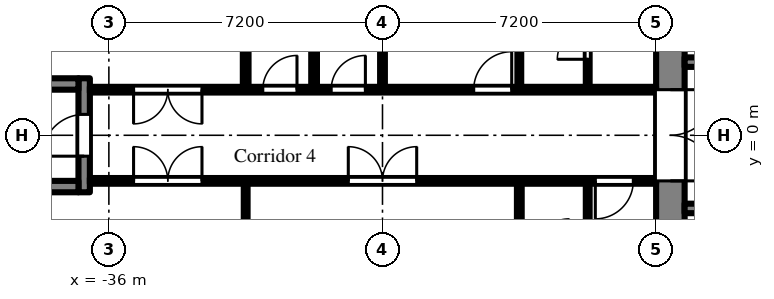
"""IFC4 building model, lengths in metres.
Left out: names, types, materials, properties, quantities, classifications, styles, units other than length and angle.
Written with IfcOpenShell. Run it as: python <this file> out.ifc"""

import sys

from ifc_helpers import new_model, si_unit, direction, frame, frame_2d, origin, place, context, subcontext, project, spatial, rectangle, extrude, element, fill, save


model = new_model("IFC4")
c1 = context("Model", 3, precision=1e-05, world=origin(), true_north=direction((0.0, 1.0)))
c2 = subcontext(c1, "Body", "Model", "MODEL_VIEW")
j1 = project(units=[si_unit("LENGTHUNIT", "METRE"), si_unit("PLANEANGLEUNIT", "RADIAN")], contexts=[c1])
p1 = place(None, origin())
s1 = spatial("IfcSite", under=j1, at=p1, CompositionType="ELEMENT")
p2 = place(p1, origin())
s2 = spatial("IfcBuilding", under=s1, at=p2, CompositionType="ELEMENT")
p3 = place(p2, frame((0.0, 0.0, 84.9)))
s3 = spatial("IfcBuildingStorey", under=s2, at=p3, CompositionType="ELEMENT", Elevation=84.9)
p4 = place(p3, frame((-21.225, -7.2, 0.0), z_axis=(0.0, 0.0, 1.0), x_axis=(0.0, 1.0, 0.0)))
e1 = element("IfcWall", 1, at=p4, inside=s3, PredefinedType="SHEAR", context=c2, shape_type="SweptSolid", body=[
    extrude(rectangle(XDim=14.4, YDim=0.75, at=frame_2d((7.2, 0.0))), origin(), (0.0, 0.0, 1.0), 2.575),
])
p5 = place(p4, frame((6.0, 0.0, 0.0)))
e2 = element("IfcOpeningElement", 2, at=p5, cuts=e1, PredefinedType="OPENING", context=c2, shape_type="SweptSolid", body=[
    extrude(rectangle(XDim=2.4, YDim=2.2, at=frame_2d((1.2, 1.1))), frame((0.0, 0.385, 0.0), z_axis=(0.0, -1.0, 0.0), x_axis=(1.0, 0.0, 0.0)), (0.0, 0.0, 1.0), 0.77),
])
p6 = place(p3, frame((-7.9, 1.925, 0.0), z_axis=(0.0, 0.0, 1.0), x_axis=(-1.0, 0.0, 0.0)))
e3 = element("IfcWall", 3, at=p6, inside=s3, PredefinedType="SHEAR", context=c2, shape_type="SweptSolid", body=[
    extrude(rectangle(XDim=12.95, YDim=0.25, at=frame_2d((6.475, 0.0))), origin(), (0.0, 0.0, 1.0), 2.575),
])
p7 = place(p6, frame((0.525, 0.0, 0.0)))
e4 = element("IfcOpeningElement", 4, at=p7, cuts=e3, PredefinedType="OPENING", context=c2, shape_type="SweptSolid", body=[
    extrude(rectangle(XDim=0.9, YDim=2.1, at=frame_2d((0.45, 1.05))), frame((0.0, 0.135, 0.0), z_axis=(0.0, -1.0, 0.0), x_axis=(1.0, 0.0, 0.0)), (0.0, 0.0, 1.0), 0.27),
])
p8 = place(p6, frame((2.625, 0.0, 0.0)))
e5 = element("IfcOpeningElement", 5, at=p8, cuts=e3, PredefinedType="OPENING", context=c2, shape_type="SweptSolid", body=[
    extrude(rectangle(XDim=1.1, YDim=2.1, at=frame_2d((0.55, 1.05))), frame((0.0, 0.135, 0.0), z_axis=(0.0, -1.0, 0.0), x_axis=(1.0, 0.0, 0.0)), (0.0, 0.0, 1.0), 0.27),
])
p9 = place(p6, frame((6.025, 0.0, 0.0)))
e6 = element("IfcOpeningElement", 6, at=p9, cuts=e3, PredefinedType="OPENING", context=c2, shape_type="SweptSolid", body=[
    extrude(rectangle(XDim=0.9, YDim=2.1, at=frame_2d((0.45, 1.05))), frame((0.0, 0.135, 0.0), z_axis=(0.0, -1.0, 0.0), x_axis=(1.0, 0.0, 0.0)), (0.0, 0.0, 1.0), 0.27),
])
p10 = place(p6, frame((9.325, 0.0, 0.0)))
e7 = element("IfcOpeningElement", 7, at=p10, cuts=e3, PredefinedType="OPENING", context=c2, shape_type="SweptSolid", body=[
    extrude(rectangle(XDim=0.9, YDim=2.1, at=frame_2d((0.45, 1.05))), frame((0.0, 0.135, 0.0), z_axis=(0.0, -1.0, 0.0), x_axis=(1.0, 0.0, 0.0)), (0.0, 0.0, 1.0), 0.27),
])
p11 = place(p3, frame((-7.9, -1.925, 0.0), z_axis=(0.0, 0.0, 1.0), x_axis=(-1.0, 0.0, 0.0)))
e8 = element("IfcWall", 8, at=p11, inside=s3, PredefinedType="SHEAR", context=c2, shape_type="SweptSolid", body=[
    extrude(rectangle(XDim=12.95, YDim=0.25, at=frame_2d((6.475, 0.0))), origin(), (0.0, 0.0, 1.0), 2.575),
])
p12 = place(p11, frame((4.825, 0.0, 0.0)))
e9 = element("IfcOpeningElement", 9, at=p12, cuts=e8, PredefinedType="OPENING", context=c2, shape_type="SweptSolid", body=[
    extrude(rectangle(XDim=1.1, YDim=2.1, at=frame_2d((0.55, 1.05))), frame((0.0, 0.135, 0.0), z_axis=(0.0, -1.0, 0.0), x_axis=(1.0, 0.0, 0.0)), (0.0, 0.0, 1.0), 0.27),
])
p13 = place(p11, frame((7.025, 0.0, 0.0)))
e10 = element("IfcOpeningElement", 10, at=p13, cuts=e8, PredefinedType="OPENING", context=c2, shape_type="SweptSolid", body=[
    extrude(rectangle(XDim=1.1, YDim=2.1, at=frame_2d((0.55, 1.05))), frame((0.0, 0.135, 0.0), z_axis=(0.0, -1.0, 0.0), x_axis=(1.0, 0.0, 0.0)), (0.0, 0.0, 1.0), 0.27),
])
p14 = place(p11, frame((9.225, 0.0, 0.0)))
e11 = element("IfcOpeningElement", 11, at=p14, cuts=e8, PredefinedType="OPENING", context=c2, shape_type="SweptSolid", body=[
    extrude(rectangle(XDim=1.1, YDim=2.1, at=frame_2d((0.55, 1.05))), frame((0.0, 0.135, 0.0), z_axis=(0.0, -1.0, 0.0), x_axis=(1.0, 0.0, 0.0)), (0.0, 0.0, 1.0), 0.27),
])
p15 = place(p11, frame((0.525, 0.0, 0.0)))
e12 = element("IfcOpeningElement", 12, at=p15, cuts=e8, PredefinedType="OPENING", context=c2, shape_type="SweptSolid", body=[
    extrude(rectangle(XDim=0.9, YDim=2.1, at=frame_2d((0.45, 1.05))), frame((0.0, 0.135, 0.0), z_axis=(0.0, -1.0, 0.0), x_axis=(1.0, 0.0, 0.0)), (0.0, 0.0, 1.0), 0.27),
])
p16 = place(p11, frame((2.625, 0.0, 0.0)))
e13 = element("IfcOpeningElement", 13, at=p16, cuts=e8, PredefinedType="OPENING", context=c2, shape_type="SweptSolid", body=[
    extrude(rectangle(XDim=1.1, YDim=2.1, at=frame_2d((0.55, 1.05))), frame((0.0, 0.135, 0.0), z_axis=(0.0, -1.0, 0.0), x_axis=(1.0, 0.0, 0.0)), (0.0, 0.0, 1.0), 0.27),
])
p17 = place(p3, frame((-36.65, -1.5, 0.0), z_axis=(0.0, 0.0, 1.0), x_axis=(0.0, 1.0, 0.0)))
e14 = element("IfcWall", 14, at=p17, inside=s3, PredefinedType="SHEAR", context=c2, shape_type="SweptSolid", body=[
    extrude(rectangle(XDim=3.0, YDim=0.3, at=frame_2d((1.5, 0.0))), origin(), (0.0, 0.0, 1.0), 2.575),
])
p18 = place(p17, frame((0.95, 0.0, 0.0)))
e15 = element("IfcOpeningElement", 15, at=p18, cuts=e14, PredefinedType="OPENING", context=c2, shape_type="SweptSolid", body=[
    extrude(rectangle(XDim=1.1, YDim=2.1, at=frame_2d((0.55, 1.05))), frame((0.0, 0.16, 0.0), z_axis=(0.0, -1.0, 0.0), x_axis=(1.0, 0.0, 0.0)), (0.0, 0.0, 1.0), 0.32),
])
for number, where, z_axis, x_axis in (
    (16, (-36.8, -1.35, 0.0), (0.0, 0.0, 1.0), (-1.0, 0.0, 0.0)),
    (17, (-36.8, 1.35, 0.0), (0.0, 0.0, 1.0), (-1.0, 0.0, 0.0)),
):
    element("IfcWall", number, at=place(p3, frame(where, z_axis=z_axis, x_axis=x_axis)), inside=s3, PredefinedType="SHEAR", context=c2, shape_type="SweptSolid", body=[
        extrude(rectangle(XDim=5.8, YDim=0.3, at=frame_2d((2.9, 0.0))), origin(), (0.0, 0.0, 1.0), 2.575),
    ])
p19 = place(p3, frame((-36.5, -1.2, 0.0), z_axis=(0.0, 0.0, 1.0), x_axis=(1.0, 0.0, 0.0)))
e18 = element("IfcWall", 18, at=p19, inside=s3, PredefinedType="PARTITIONING", context=c2, shape_type="SweptSolid", body=[
    extrude(rectangle(XDim=14.9, YDim=0.15, at=frame_2d((7.45, 0.0))), origin(), (0.0, 0.0, 1.0), 2.575),
])
p20 = place(p19, frame((13.3, 0.0, 0.0)))
e19 = element("IfcOpeningElement", 19, at=p20, cuts=e18, PredefinedType="OPENING", context=c2, shape_type="SweptSolid", body=[
    extrude(rectangle(XDim=1.0, YDim=2.1, at=frame_2d((0.5, 1.05))), frame((0.0, 0.085, 0.0), z_axis=(0.0, -1.0, 0.0), x_axis=(1.0, 0.0, 0.0)), (0.0, 0.0, 1.0), 0.17),
])
p21 = place(p19, frame((6.8, 0.0, 0.0)))
e20 = element("IfcOpeningElement", 20, at=p21, cuts=e18, PredefinedType="OPENING", context=c2, shape_type="SweptSolid", body=[
    extrude(rectangle(XDim=1.8, YDim=2.1, at=frame_2d((0.9, 1.05))), frame((0.0, 0.085, 0.0), z_axis=(0.0, -1.0, 0.0), x_axis=(1.0, 0.0, 0.0)), (0.0, 0.0, 1.0), 0.17),
])
p22 = place(p19, frame((1.15, 0.0, 0.0)))
e21 = element("IfcOpeningElement", 21, at=p22, cuts=e18, PredefinedType="OPENING", context=c2, shape_type="SweptSolid", body=[
    extrude(rectangle(XDim=1.8, YDim=2.1, at=frame_2d((0.9, 1.05))), frame((0.0, 0.085, 0.0), z_axis=(0.0, -1.0, 0.0), x_axis=(1.0, 0.0, 0.0)), (0.0, 0.0, 1.0), 0.17),
])
p23 = place(p3, frame((-36.5, 1.2, 0.0), z_axis=(0.0, 0.0, 1.0), x_axis=(1.0, 0.0, 0.0)))
e22 = element("IfcWall", 22, at=p23, inside=s3, PredefinedType="PARTITIONING", context=c2, shape_type="SweptSolid", body=[
    extrude(rectangle(XDim=14.9, YDim=0.15, at=frame_2d((7.45, 0.0))), origin(), (0.0, 0.0, 1.0), 2.575),
])
p24 = place(p23, frame((10.1, 0.0, 0.0)))
e23 = element("IfcOpeningElement", 23, at=p24, cuts=e22, PredefinedType="OPENING", context=c2, shape_type="SweptSolid", body=[
    extrude(rectangle(XDim=1.0, YDim=2.1, at=frame_2d((0.5, 1.05))), frame((0.0, 0.085, 0.0), z_axis=(0.0, -1.0, 0.0), x_axis=(1.0, 0.0, 0.0)), (0.0, 0.0, 1.0), 0.17),
])
p25 = place(p23, frame((6.35, 0.0, 0.0)))
e24 = element("IfcOpeningElement", 24, at=p25, cuts=e22, PredefinedType="OPENING", context=c2, shape_type="SweptSolid", body=[
    extrude(rectangle(XDim=0.9, YDim=2.1, at=frame_2d((0.45, 1.05))), frame((0.0, 0.085, 0.0), z_axis=(0.0, -1.0, 0.0), x_axis=(1.0, 0.0, 0.0)), (0.0, 0.0, 1.0), 0.17),
])
p26 = place(p23, frame((4.55, 0.0, 0.0)))
e25 = element("IfcOpeningElement", 25, at=p26, cuts=e22, PredefinedType="OPENING", context=c2, shape_type="SweptSolid", body=[
    extrude(rectangle(XDim=0.9, YDim=2.1, at=frame_2d((0.45, 1.05))), frame((0.0, 0.085, 0.0), z_axis=(0.0, -1.0, 0.0), x_axis=(1.0, 0.0, 0.0)), (0.0, 0.0, 1.0), 0.17),
])
p27 = place(p23, frame((1.15, 0.0, 0.0)))
e26 = element("IfcOpeningElement", 26, at=p27, cuts=e22, PredefinedType="OPENING", context=c2, shape_type="SweptSolid", body=[
    extrude(rectangle(XDim=1.8, YDim=2.1, at=frame_2d((0.9, 1.05))), frame((0.0, 0.085, 0.0), z_axis=(0.0, -1.0, 0.0), x_axis=(1.0, 0.0, 0.0)), (0.0, 0.0, 1.0), 0.17),
])
p28 = place(p3, frame((-32.4, -6.9, 0.0), z_axis=(0.0, 0.0, 1.0), x_axis=(0.0, 1.0, 0.0)))
e27 = element("IfcWall", 27, at=p28, inside=s3, PredefinedType="PARTITIONING", context=c2, shape_type="SweptSolid", body=[
    extrude(rectangle(XDim=5.625, YDim=0.1, at=frame_2d((2.812, 0.0))), origin(), (0.0, 0.0, 1.0), 2.575),
])
for number, where, z_axis, x_axis in (
    (28, (-32.4, 1.275, 0.0), (0.0, 0.0, 1.0), (0.0, 1.0, 0.0)),
    (29, (-30.6, 1.275, 0.0), (0.0, 0.0, 1.0), (0.0, 1.0, 0.0)),
):
    element("IfcWall", number, at=place(p3, frame(where, z_axis=z_axis, x_axis=x_axis)), inside=s3, PredefinedType="PARTITIONING", context=c2, shape_type="SweptSolid", body=[
        extrude(rectangle(XDim=5.625, YDim=0.15, at=frame_2d((2.812, 0.0))), origin(), (0.0, 0.0, 1.0), 2.575),
    ])
p29 = place(p3, frame((-28.8, 1.275, 0.0), z_axis=(0.0, 0.0, 1.0), x_axis=(0.0, 1.0, 0.0)))
e30 = element("IfcWall", 30, at=p29, inside=s3, PredefinedType="PARTITIONING", context=c2, shape_type="SweptSolid", body=[
    extrude(rectangle(XDim=5.625, YDim=0.125, at=frame_2d((2.812, 0.0))), origin(), (0.0, 0.0, 1.0), 2.575),
])
p30 = place(p3, frame((-25.2, -3.0, 0.0), z_axis=(0.0, 0.0, 1.0), x_axis=(0.0, 1.0, 0.0)))
e31 = element("IfcWall", 31, at=p30, inside=s3, PredefinedType="PARTITIONING", context=c2, shape_type="SweptSolid", body=[
    extrude(rectangle(XDim=1.725, YDim=0.125, at=frame_2d((0.863, 0.0))), origin(), (0.0, 0.0, 1.0), 2.575),
])
p31 = place(p3, frame((-25.2, 1.275, 0.0), z_axis=(0.0, 0.0, 1.0), x_axis=(0.0, 1.0, 0.0)))
e32 = element("IfcWall", 32, at=p31, inside=s3, PredefinedType="PARTITIONING", context=c2, shape_type="SweptSolid", body=[
    extrude(rectangle(XDim=2.375, YDim=0.1, at=frame_2d((1.188, 0.0))), origin(), (0.0, 0.0, 1.0), 2.575),
])
p32 = place(p3, frame((-23.4, -3.05, 0.0), z_axis=(0.0, 0.0, 1.0), x_axis=(0.0, 1.0, 0.0)))
e33 = element("IfcWall", 33, at=p32, inside=s3, PredefinedType="PARTITIONING", context=c2, shape_type="SweptSolid", body=[
    extrude(rectangle(XDim=1.775, YDim=0.1, at=frame_2d((0.888, 0.0))), origin(), (0.0, 0.0, 1.0), 2.575),
])
p33 = place(p3, frame((-23.4, 1.275, 0.0), z_axis=(0.0, 0.0, 1.0), x_axis=(0.0, 1.0, 0.0)))
e34 = element("IfcWall", 34, at=p33, inside=s3, PredefinedType="PARTITIONING", context=c2, shape_type="SweptSolid", body=[
    extrude(rectangle(XDim=2.275, YDim=0.1, at=frame_2d((1.138, 0.0))), origin(), (0.0, 0.0, 1.0), 2.575),
])
p34 = place(p33, frame((0.725, 0.0, 0.0)))
e35 = element("IfcOpeningElement", 35, at=p34, cuts=e34, PredefinedType="OPENING", context=c2, shape_type="SweptSolid", body=[
    extrude(rectangle(XDim=0.8, YDim=2.1, at=frame_2d((0.4, 1.05))), frame((0.0, 0.06, 0.0), z_axis=(0.0, -1.0, 0.0), x_axis=(1.0, 0.0, 0.0)), (0.0, 0.0, 1.0), 0.12),
])
p35 = place(p5, frame((2.4, 0.0, 0.0), z_axis=(0.0, 0.0, 1.0), x_axis=(-1.0, 0.0, 0.0)))
e36 = element("IfcDoor", 36, at=p35, inside=s3, OperationType="DOUBLE_DOOR_DOUBLE_SWING", PredefinedType="DOOR", context=c2, shape_type="SweptSolid", body=[
    extrude(rectangle(XDim=2.4, YDim=2.2, at=frame_2d((1.2, 1.1))), frame((0.0, 0.025, 0.0), z_axis=(0.0, -1.0, 0.0), x_axis=(1.0, 0.0, 0.0)), (0.0, 0.0, 1.0), 0.05),
])
fill(e2, e36)
p36 = place(p18, origin())
e37 = element("IfcDoor", 37, at=p36, inside=s3, OperationType="SINGLE_SWING_LEFT", PredefinedType="DOOR", context=c2, shape_type="SweptSolid", body=[
    extrude(rectangle(XDim=1.1, YDim=2.1, at=frame_2d((0.55, 1.05))), frame((0.0, 0.025, 0.0), z_axis=(0.0, -1.0, 0.0), x_axis=(1.0, 0.0, 0.0)), (0.0, 0.0, 1.0), 0.05),
])
fill(e15, e37)
p37 = place(p20, frame((1.0, 0.0, 0.0), z_axis=(0.0, 0.0, 1.0), x_axis=(-1.0, 0.0, 0.0)))
e38 = element("IfcDoor", 38, at=p37, inside=s3, OperationType="SINGLE_SWING_RIGHT", PredefinedType="DOOR", context=c2, shape_type="SweptSolid", body=[
    extrude(rectangle(XDim=1.0, YDim=2.1, at=frame_2d((0.5, 1.05))), frame((0.0, 0.025, 0.0), z_axis=(0.0, -1.0, 0.0), x_axis=(1.0, 0.0, 0.0)), (0.0, 0.0, 1.0), 0.05),
])
fill(e19, e38)
p38 = place(p21, origin())
e39 = element("IfcDoor", 39, at=p38, inside=s3, OperationType="DOUBLE_DOOR_DOUBLE_SWING", PredefinedType="DOOR", context=c2, shape_type="SweptSolid", body=[
    extrude(rectangle(XDim=1.8, YDim=2.1, at=frame_2d((0.9, 1.05))), frame((0.0, 0.025, 0.0), z_axis=(0.0, -1.0, 0.0), x_axis=(1.0, 0.0, 0.0)), (0.0, 0.0, 1.0), 0.05),
])
fill(e20, e39)
p39 = place(p22, origin())
e40 = element("IfcDoor", 40, at=p39, inside=s3, OperationType="DOUBLE_DOOR_DOUBLE_SWING", PredefinedType="DOOR", context=c2, shape_type="SweptSolid", body=[
    extrude(rectangle(XDim=1.8, YDim=2.1, at=frame_2d((0.9, 1.05))), frame((0.0, 0.025, 0.0), z_axis=(0.0, -1.0, 0.0), x_axis=(1.0, 0.0, 0.0)), (0.0, 0.0, 1.0), 0.05),
])
fill(e21, e40)
p40 = place(p34, origin())
e41 = element("IfcDoor", 41, at=p40, inside=s3, OperationType="SINGLE_SWING_LEFT", PredefinedType="DOOR", context=c2, shape_type="SweptSolid", body=[
    extrude(rectangle(XDim=0.8, YDim=2.1, at=frame_2d((0.4, 1.05))), frame((0.0, 0.025, 0.0), z_axis=(0.0, -1.0, 0.0), x_axis=(1.0, 0.0, 0.0)), (0.0, 0.0, 1.0), 0.05),
])
fill(e35, e41)
p41 = place(p24, origin())
e42 = element("IfcDoor", 42, at=p41, inside=s3, OperationType="SINGLE_SWING_RIGHT", PredefinedType="DOOR", context=c2, shape_type="SweptSolid", body=[
    extrude(rectangle(XDim=1.0, YDim=2.1, at=frame_2d((0.5, 1.05))), frame((0.0, 0.025, 0.0), z_axis=(0.0, -1.0, 0.0), x_axis=(1.0, 0.0, 0.0)), (0.0, 0.0, 1.0), 0.05),
])
fill(e23, e42)
p42 = place(p25, origin())
e43 = element("IfcDoor", 43, at=p42, inside=s3, OperationType="SINGLE_SWING_RIGHT", PredefinedType="DOOR", context=c2, shape_type="SweptSolid", body=[
    extrude(rectangle(XDim=0.9, YDim=2.1, at=frame_2d((0.45, 1.05))), frame((0.0, 0.025, 0.0), z_axis=(0.0, -1.0, 0.0), x_axis=(1.0, 0.0, 0.0)), (0.0, 0.0, 1.0), 0.05),
])
fill(e24, e43)
p43 = place(p26, origin())
e44 = element("IfcDoor", 44, at=p43, inside=s3, OperationType="SINGLE_SWING_RIGHT", PredefinedType="DOOR", context=c2, shape_type="SweptSolid", body=[
    extrude(rectangle(XDim=0.9, YDim=2.1, at=frame_2d((0.45, 1.05))), frame((0.0, 0.025, 0.0), z_axis=(0.0, -1.0, 0.0), x_axis=(1.0, 0.0, 0.0)), (0.0, 0.0, 1.0), 0.05),
])
fill(e25, e44)
p44 = place(p27, frame((1.8, 0.0, 0.0), z_axis=(0.0, 0.0, 1.0), x_axis=(-1.0, 0.0, 0.0)))
e45 = element("IfcDoor", 45, at=p44, inside=s3, OperationType="DOUBLE_DOOR_DOUBLE_SWING", PredefinedType="DOOR", context=c2, shape_type="SweptSolid", body=[
    extrude(rectangle(XDim=1.8, YDim=2.1, at=frame_2d((0.9, 1.05))), frame((0.0, 0.025, 0.0), z_axis=(0.0, -1.0, 0.0), x_axis=(1.0, 0.0, 0.0)), (0.0, 0.0, 1.0), 0.05),
])
fill(e26, e45)
save(model, sys.argv[1])
